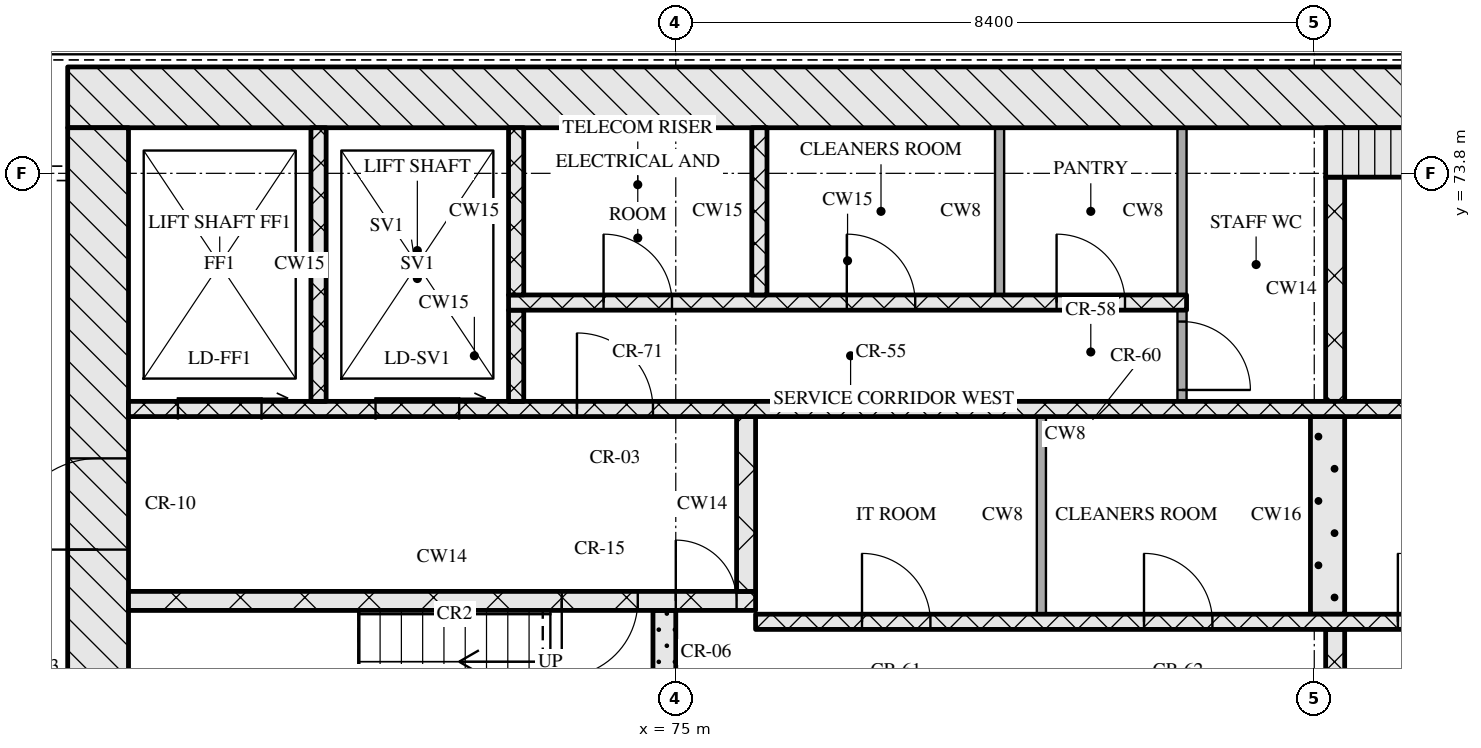
"""IFC4 building model, lengths in metres.
Left out: names, types, materials, properties, quantities, classifications, styles, units other than length and angle.
Written with IfcOpenShell. Run it as: python <this file> out.ifc"""

import sys

from ifc_helpers import new_model, si_unit, direction, frame, frame_2d, origin, place, context, subcontext, project, spatial, rectangle, extrude, element, fill, save


model = new_model("IFC4")
c1 = context("Model", 3, precision=1e-05, world=origin(), true_north=direction((0.0, 1.0)))
c2 = subcontext(c1, "Body", "Model", "MODEL_VIEW")
j1 = project(units=[si_unit("LENGTHUNIT", "METRE"), si_unit("PLANEANGLEUNIT", "RADIAN")], contexts=[c1])
p1 = place(None, origin())
s1 = spatial("IfcSite", under=j1, at=p1, CompositionType="ELEMENT")
p2 = place(p1, origin())
s2 = spatial("IfcBuilding", under=s1, at=p2, CompositionType="ELEMENT")
p3 = place(p2, frame((0.0, 0.0, 147.45)))
s3 = spatial("IfcBuildingStorey", under=s2, at=p3, CompositionType="ELEMENT", Elevation=147.45)
p4 = place(p3, frame((67.0, 74.8, 0.0), z_axis=(0.0, 0.0, 1.0), x_axis=(1.0, 0.0, 0.0)))
e1 = element("IfcWall", 1, at=p4, inside=s3, PredefinedType="SOLIDWALL", context=c2, shape_type="SweptSolid", body=[
    extrude(rectangle(XDim=41.2, YDim=0.8, at=frame_2d((20.6, 0.0))), origin(), (0.0, 0.0, 1.0), 3.32),
])
p5 = place(p3, frame((67.4, 62.4, 0.0), z_axis=(0.0, 0.0, 1.0), x_axis=(0.0, 1.0, 0.0)))
e2 = element("IfcWall", 2, at=p5, inside=s3, PredefinedType="SOLIDWALL", context=c2, shape_type="SweptSolid", body=[
    extrude(rectangle(XDim=12.0, YDim=0.8, at=frame_2d((6.0, 0.0))), origin(), (0.0, 0.0, 1.0), 3.32),
])
p6 = place(p5, frame((6.45, 0.0, 0.0)))
e3 = element("IfcOpeningElement", 3, at=p6, cuts=e2, PredefinedType="OPENING", context=c2, shape_type="SweptSolid", body=[
    extrude(rectangle(XDim=1.2, YDim=2.1, at=frame_2d((0.6, 1.05))), frame((0.0, 0.41, 0.0), z_axis=(0.0, -1.0, 0.0), x_axis=(1.0, 0.0, 0.0)), (0.0, 0.0, 1.0), 0.82),
])
p7 = place(p3, frame((74.85, 65.2, 0.0), z_axis=(0.0, 0.0, 1.0), x_axis=(0.0, 1.0, 0.0)))
e4 = element("IfcWall", 4, at=p7, inside=s3, PredefinedType="SOLIDWALL", context=c2, shape_type="SweptSolid", body=[
    extrude(rectangle(XDim=2.85, YDim=0.3, at=frame_2d((1.425, 0.0))), origin(), (0.0, 0.0, 1.0), 3.32),
])
p8 = place(p3, frame((83.675, 65.2, 0.0), z_axis=(0.0, 0.0, 1.0), x_axis=(0.0, 1.0, 0.0)))
e5 = element("IfcWall", 5, at=p8, inside=s3, PredefinedType="SOLIDWALL", context=c2, shape_type="SweptSolid", body=[
    extrude(rectangle(XDim=2.6, YDim=0.25, at=frame_2d((1.3, 0.0))), origin(), (0.0, 0.0, 1.0), 3.32),
])
p9 = place(p8, frame((0.7, 0.0, 0.0)))
e6 = element("IfcOpeningElement", 6, at=p9, cuts=e5, PredefinedType="OPENING", context=c2, shape_type="SweptSolid", body=[
    extrude(rectangle(XDim=1.2, YDim=2.1, at=frame_2d((0.6, 1.05))), frame((0.0, 0.135, 0.0), z_axis=(0.0, -1.0, 0.0), x_axis=(1.0, 0.0, 0.0)), (0.0, 0.0, 1.0), 0.27),
])
p10 = place(p3, frame((76.05, 67.9, 0.0), z_axis=(0.0, 0.0, 1.0), x_axis=(1.0, 0.0, 0.0)))
e7 = element("IfcWall", 7, at=p10, inside=s3, PredefinedType="SOLIDWALL", context=c2, shape_type="SweptSolid", body=[
    extrude(rectangle(XDim=23.1, YDim=0.2, at=frame_2d((11.55, 0.0))), origin(), (0.0, 0.0, 1.0), 3.32),
])
p11 = place(p10, frame((1.4, 0.0, 0.0)))
e8 = element("IfcOpeningElement", 8, at=p11, cuts=e7, PredefinedType="OPENING", context=c2, shape_type="SweptSolid", body=[
    extrude(rectangle(XDim=0.9, YDim=2.1, at=frame_2d((0.45, 1.05))), frame((0.0, 0.11, 0.0), z_axis=(0.0, -1.0, 0.0), x_axis=(1.0, 0.0, 0.0)), (0.0, 0.0, 1.0), 0.22),
])
p12 = place(p10, frame((5.11, 0.0, 0.0)))
e9 = element("IfcOpeningElement", 9, at=p12, cuts=e7, PredefinedType="OPENING", context=c2, shape_type="SweptSolid", body=[
    extrude(rectangle(XDim=0.9, YDim=2.1, at=frame_2d((0.45, 1.05))), frame((0.0, 0.11, 0.0), z_axis=(0.0, -1.0, 0.0), x_axis=(1.0, 0.0, 0.0)), (0.0, 0.0, 1.0), 0.22),
])
p13 = place(p10, frame((8.45, 0.0, 0.0)))
e10 = element("IfcOpeningElement", 10, at=p13, cuts=e7, PredefinedType="OPENING", context=c2, shape_type="SweptSolid", body=[
    extrude(rectangle(XDim=0.9, YDim=2.1, at=frame_2d((0.45, 1.05))), frame((0.0, 0.11, 0.0), z_axis=(0.0, -1.0, 0.0), x_axis=(1.0, 0.0, 0.0)), (0.0, 0.0, 1.0), 0.22),
])
p14 = place(p10, frame((10.91, 0.0, 0.0)))
e11 = element("IfcOpeningElement", 11, at=p14, cuts=e7, PredefinedType="OPENING", context=c2, shape_type="SweptSolid", body=[
    extrude(rectangle(XDim=0.9, YDim=2.1, at=frame_2d((0.45, 1.05))), frame((0.0, 0.11, 0.0), z_axis=(0.0, -1.0, 0.0), x_axis=(1.0, 0.0, 0.0)), (0.0, 0.0, 1.0), 0.22),
])
p15 = place(p10, frame((13.55, 0.0, 0.0)))
e12 = element("IfcOpeningElement", 12, at=p15, cuts=e7, PredefinedType="OPENING", context=c2, shape_type="SweptSolid", body=[
    extrude(rectangle(XDim=1.0, YDim=2.1, at=frame_2d((0.5, 1.05))), frame((0.0, 0.11, 0.0), z_axis=(0.0, -1.0, 0.0), x_axis=(1.0, 0.0, 0.0)), (0.0, 0.0, 1.0), 0.22),
])
p16 = place(p10, frame((16.2, 0.0, 0.0)))
e13 = element("IfcOpeningElement", 13, at=p16, cuts=e7, PredefinedType="OPENING", context=c2, shape_type="SweptSolid", body=[
    extrude(rectangle(XDim=1.1, YDim=2.1, at=frame_2d((0.55, 1.05))), frame((0.0, 0.11, 0.0), z_axis=(0.0, -1.0, 0.0), x_axis=(1.0, 0.0, 0.0)), (0.0, 0.0, 1.0), 0.22),
])
p17 = place(p10, frame((18.7, 0.0, 0.0)))
e14 = element("IfcOpeningElement", 14, at=p17, cuts=e7, PredefinedType="OPENING", context=c2, shape_type="SweptSolid", body=[
    extrude(rectangle(XDim=1.1, YDim=2.1, at=frame_2d((0.55, 1.05))), frame((0.0, 0.11, 0.0), z_axis=(0.0, -1.0, 0.0), x_axis=(1.0, 0.0, 0.0)), (0.0, 0.0, 1.0), 0.22),
])
p18 = place(p10, frame((21.2, 0.0, 0.0)))
e15 = element("IfcOpeningElement", 15, at=p18, cuts=e7, PredefinedType="OPENING", context=c2, shape_type="SweptSolid", body=[
    extrude(rectangle(XDim=1.1, YDim=2.1, at=frame_2d((0.55, 1.05))), frame((0.0, 0.11, 0.0), z_axis=(0.0, -1.0, 0.0), x_axis=(1.0, 0.0, 0.0)), (0.0, 0.0, 1.0), 0.22),
])
p19 = place(p3, frame((79.81, 68.0, 0.0), z_axis=(0.0, 0.0, 1.0), x_axis=(0.0, 1.0, 0.0)))
e16 = element("IfcWall", 16, at=p19, inside=s3, PredefinedType="PARTITIONING", context=c2, shape_type="SweptSolid", body=[
    extrude(rectangle(XDim=2.6, YDim=0.12, at=frame_2d((1.3, 0.0))), origin(), (0.0, 0.0, 1.0), 3.32),
])
p20 = place(p3, frame((83.575, 68.0, 0.0), z_axis=(0.0, 0.0, 1.0), x_axis=(0.0, 1.0, 0.0)))
e17 = element("IfcWall", 17, at=p20, inside=s3, PredefinedType="SOLIDWALL", context=c2, shape_type="SweptSolid", body=[
    extrude(rectangle(XDim=2.6, YDim=0.45, at=frame_2d((1.3, 0.0))), origin(), (0.0, 0.0, 1.0), 3.32),
])
p21 = place(p3, frame((67.8, 68.175, 0.0), z_axis=(0.0, 0.0, 1.0), x_axis=(1.0, 0.0, 0.0)))
e18 = element("IfcWall", 18, at=p21, inside=s3, PredefinedType="SOLIDWALL", context=c2, shape_type="SweptSolid", body=[
    extrude(rectangle(XDim=8.25, YDim=0.25, at=frame_2d((4.125, 0.0))), origin(), (0.0, 0.0, 1.0), 3.32),
])
p22 = place(p21, frame((5.7, 0.0, 0.0)))
e19 = element("IfcOpeningElement", 19, at=p22, cuts=e18, PredefinedType="OPENING", context=c2, shape_type="SweptSolid", body=[
    extrude(rectangle(XDim=1.0, YDim=2.1, at=frame_2d((0.5, 1.05))), frame((0.0, 0.135, 0.0), z_axis=(0.0, -1.0, 0.0), x_axis=(1.0, 0.0, 0.0)), (0.0, 0.0, 1.0), 0.27),
])
p23 = place(p21, frame((7.2, 0.0, 0.0)))
e20 = element("IfcOpeningElement", 20, at=p23, cuts=e18, PredefinedType="OPENING", context=c2, shape_type="SweptSolid", body=[
    extrude(rectangle(XDim=0.8, YDim=2.1, at=frame_2d((0.4, 1.05))), frame((0.0, 0.135, 0.0), z_axis=(0.0, -1.0, 0.0), x_axis=(1.0, 0.0, 0.0)), (0.0, 0.0, 1.0), 0.27),
])
p24 = place(p3, frame((75.925, 68.3, 0.0), z_axis=(0.0, 0.0, 1.0), x_axis=(0.0, 1.0, 0.0)))
e21 = element("IfcWall", 21, at=p24, inside=s3, PredefinedType="SOLIDWALL", context=c2, shape_type="SweptSolid", body=[
    extrude(rectangle(XDim=2.3, YDim=0.25, at=frame_2d((1.15, 0.0))), origin(), (0.0, 0.0, 1.0), 3.32),
])
p25 = place(p3, frame((67.8, 70.7, 0.0), z_axis=(0.0, 0.0, 1.0), x_axis=(1.0, 0.0, 0.0)))
e22 = element("IfcWall", 22, at=p25, inside=s3, PredefinedType="SOLIDWALL", context=c2, shape_type="SweptSolid", body=[
    extrude(rectangle(XDim=39.6, YDim=0.2, at=frame_2d((19.8, 0.0))), origin(), (0.0, 0.0, 1.0), 3.32),
])
p26 = place(p25, frame((0.65, 0.0, 0.0)))
e23 = element("IfcOpeningElement", 23, at=p26, cuts=e22, PredefinedType="OPENING", context=c2, shape_type="SweptSolid", body=[
    extrude(rectangle(XDim=1.1, YDim=2.1, at=frame_2d((0.55, 1.05))), frame((0.0, 0.11, 0.0), z_axis=(0.0, -1.0, 0.0), x_axis=(1.0, 0.0, 0.0)), (0.0, 0.0, 1.0), 0.22),
])
p27 = place(p25, frame((3.25, 0.0, 0.0)))
e24 = element("IfcOpeningElement", 24, at=p27, cuts=e22, PredefinedType="OPENING", context=c2, shape_type="SweptSolid", body=[
    extrude(rectangle(XDim=1.1, YDim=2.1, at=frame_2d((0.55, 1.05))), frame((0.0, 0.11, 0.0), z_axis=(0.0, -1.0, 0.0), x_axis=(1.0, 0.0, 0.0)), (0.0, 0.0, 1.0), 0.22),
])
p28 = place(p25, frame((5.9, 0.0, 0.0)))
e25 = element("IfcOpeningElement", 25, at=p28, cuts=e22, PredefinedType="OPENING", context=c2, shape_type="SweptSolid", body=[
    extrude(rectangle(XDim=1.0, YDim=2.1, at=frame_2d((0.5, 1.05))), frame((0.0, 0.11, 0.0), z_axis=(0.0, -1.0, 0.0), x_axis=(1.0, 0.0, 0.0)), (0.0, 0.0, 1.0), 0.22),
])
p29 = place(p25, frame((21.7, 0.0, 0.0)))
e26 = element("IfcOpeningElement", 26, at=p29, cuts=e22, PredefinedType="OPENING", context=c2, shape_type="SweptSolid", body=[
    extrude(rectangle(XDim=1.0, YDim=2.1, at=frame_2d((0.5, 1.05))), frame((0.0, 0.11, 0.0), z_axis=(0.0, -1.0, 0.0), x_axis=(1.0, 0.0, 0.0)), (0.0, 0.0, 1.0), 0.22),
])
p30 = place(p25, frame((32.7, 0.0, 0.0)))
e27 = element("IfcOpeningElement", 27, at=p30, cuts=e22, PredefinedType="OPENING", context=c2, shape_type="SweptSolid", body=[
    extrude(rectangle(XDim=1.0, YDim=2.1, at=frame_2d((0.5, 1.05))), frame((0.0, 0.11, 0.0), z_axis=(0.0, -1.0, 0.0), x_axis=(1.0, 0.0, 0.0)), (0.0, 0.0, 1.0), 0.22),
])
p31 = place(p25, frame((35.25, 0.0, 0.0)))
e28 = element("IfcOpeningElement", 28, at=p31, cuts=e22, PredefinedType="OPENING", context=c2, shape_type="SweptSolid", body=[
    extrude(rectangle(XDim=1.1, YDim=2.1, at=frame_2d((0.55, 1.05))), frame((0.0, 0.11, 0.0), z_axis=(0.0, -1.0, 0.0), x_axis=(1.0, 0.0, 0.0)), (0.0, 0.0, 1.0), 0.22),
])
p32 = place(p25, frame((37.85, 0.0, 0.0)))
e29 = element("IfcOpeningElement", 29, at=p32, cuts=e22, PredefinedType="OPENING", context=c2, shape_type="SweptSolid", body=[
    extrude(rectangle(XDim=1.1, YDim=2.1, at=frame_2d((0.55, 1.05))), frame((0.0, 0.11, 0.0), z_axis=(0.0, -1.0, 0.0), x_axis=(1.0, 0.0, 0.0)), (0.0, 0.0, 1.0), 0.22),
])
p33 = place(p3, frame((70.3, 70.8, 0.0), z_axis=(0.0, 0.0, 1.0), x_axis=(0.0, 1.0, 0.0)))
e30 = element("IfcWall", 30, at=p33, inside=s3, PredefinedType="SOLIDWALL", context=c2, shape_type="SweptSolid", body=[
    extrude(rectangle(XDim=3.6, YDim=0.2, at=frame_2d((1.8, 0.0))), origin(), (0.0, 0.0, 1.0), 3.32),
])
p34 = place(p3, frame((72.9, 70.8, 0.0), z_axis=(0.0, 0.0, 1.0), x_axis=(0.0, 1.0, 0.0)))
e31 = element("IfcWall", 31, at=p34, inside=s3, PredefinedType="SOLIDWALL", context=c2, shape_type="SweptSolid", body=[
    extrude(rectangle(XDim=1.2, YDim=0.2, at=frame_2d((0.6, 0.0))), origin(), (0.0, 0.0, 1.0), 3.32),
])
p35 = place(p3, frame((81.66, 70.8, 0.0), z_axis=(0.0, 0.0, 1.0), x_axis=(0.0, 1.0, 0.0)))
e32 = element("IfcWall", 32, at=p35, inside=s3, PredefinedType="PARTITIONING", context=c2, shape_type="SweptSolid", body=[
    extrude(rectangle(XDim=1.2, YDim=0.12, at=frame_2d((0.6, 0.0))), origin(), (0.0, 0.0, 1.0), 3.32),
])
p36 = place(p35, frame((0.15, 0.0, 0.0)))
e33 = element("IfcOpeningElement", 33, at=p36, cuts=e32, PredefinedType="OPENING", context=c2, shape_type="SweptSolid", body=[
    extrude(rectangle(XDim=0.9, YDim=2.1, at=frame_2d((0.45, 1.05))), frame((0.0, 0.07, 0.0), z_axis=(0.0, -1.0, 0.0), x_axis=(1.0, 0.0, 0.0)), (0.0, 0.0, 1.0), 0.14),
])
p37 = place(p3, frame((83.675, 70.8, 0.0), z_axis=(0.0, 0.0, 1.0), x_axis=(0.0, 1.0, 0.0)))
e34 = element("IfcWall", 34, at=p37, inside=s3, PredefinedType="SOLIDWALL", context=c2, shape_type="SweptSolid", body=[
    extrude(rectangle(XDim=2.95, YDim=0.25, at=frame_2d((1.475, 0.0))), origin(), (0.0, 0.0, 1.0), 3.32),
])
p38 = place(p3, frame((72.8, 72.1, 0.0), z_axis=(0.0, 0.0, 1.0), x_axis=(1.0, 0.0, 0.0)))
e35 = element("IfcWall", 35, at=p38, inside=s3, PredefinedType="SOLIDWALL", context=c2, shape_type="SweptSolid", body=[
    extrude(rectangle(XDim=8.92, YDim=0.2, at=frame_2d((4.46, 0.0))), origin(), (0.0, 0.0, 1.0), 3.32),
])
p39 = place(p38, frame((1.25, 0.0, 0.0)))
e36 = element("IfcOpeningElement", 36, at=p39, cuts=e35, PredefinedType="OPENING", context=c2, shape_type="SweptSolid", body=[
    extrude(rectangle(XDim=0.9, YDim=2.1, at=frame_2d((0.45, 1.05))), frame((0.0, 0.11, 0.0), z_axis=(0.0, -1.0, 0.0), x_axis=(1.0, 0.0, 0.0)), (0.0, 0.0, 1.0), 0.22),
])
p40 = place(p38, frame((4.45, 0.0, 0.0)))
e37 = element("IfcOpeningElement", 37, at=p40, cuts=e35, PredefinedType="OPENING", context=c2, shape_type="SweptSolid", body=[
    extrude(rectangle(XDim=0.9, YDim=2.1, at=frame_2d((0.45, 1.05))), frame((0.0, 0.11, 0.0), z_axis=(0.0, -1.0, 0.0), x_axis=(1.0, 0.0, 0.0)), (0.0, 0.0, 1.0), 0.22),
])
p41 = place(p38, frame((7.21, 0.0, 0.0)))
e38 = element("IfcOpeningElement", 38, at=p41, cuts=e35, PredefinedType="OPENING", context=c2, shape_type="SweptSolid", body=[
    extrude(rectangle(XDim=0.9, YDim=2.1, at=frame_2d((0.45, 1.05))), frame((0.0, 0.11, 0.0), z_axis=(0.0, -1.0, 0.0), x_axis=(1.0, 0.0, 0.0)), (0.0, 0.0, 1.0), 0.22),
])
for number, where, z_axis, x_axis in (
    (39, (72.9, 72.2, 0.0), (0.0, 0.0, 1.0), (0.0, 1.0, 0.0)),
    (40, (76.1, 72.2, 0.0), (0.0, 0.0, 1.0), (0.0, 1.0, 0.0)),
):
    element("IfcWall", number, at=place(p3, frame(where, z_axis=z_axis, x_axis=x_axis)), inside=s3, PredefinedType="SOLIDWALL", context=c2, shape_type="SweptSolid", body=[
        extrude(rectangle(XDim=2.2, YDim=0.2, at=frame_2d((1.1, 0.0))), origin(), (0.0, 0.0, 1.0), 3.32),
    ])
for number, where, z_axis, x_axis in (
    (41, (79.26, 72.2, 0.0), (0.0, 0.0, 1.0), (0.0, 1.0, 0.0)),
    (42, (81.66, 72.2, 0.0), (0.0, 0.0, 1.0), (0.0, 1.0, 0.0)),
):
    element("IfcWall", number, at=place(p3, frame(where, z_axis=z_axis, x_axis=x_axis)), inside=s3, PredefinedType="PARTITIONING", context=c2, shape_type="SweptSolid", body=[
        extrude(rectangle(XDim=2.2, YDim=0.12, at=frame_2d((1.1, 0.0))), origin(), (0.0, 0.0, 1.0), 3.32),
    ])
p42 = place(p3, frame((83.55, 74.075, 0.0), z_axis=(0.0, 0.0, 1.0), x_axis=(1.0, 0.0, 0.0)))
e43 = element("IfcWall", 43, at=p42, inside=s3, PredefinedType="SOLIDWALL", context=c2, shape_type="SweptSolid", body=[
    extrude(rectangle(XDim=8.1, YDim=0.65, at=frame_2d((4.05, 0.0))), origin(), (0.0, 0.0, 1.0), 3.32),
])
p43 = place(p11, origin())
e44 = element("IfcDoor", 44, at=p43, inside=s3, OperationType="SINGLE_SWING_LEFT", PredefinedType="DOOR", context=c2, shape_type="SweptSolid", body=[
    extrude(rectangle(XDim=0.9, YDim=2.1, at=frame_2d((0.45, 1.05))), frame((0.0, 0.025, 0.0), z_axis=(0.0, -1.0, 0.0), x_axis=(1.0, 0.0, 0.0)), (0.0, 0.0, 1.0), 0.05),
])
fill(e8, e44)
p44 = place(p12, origin())
e45 = element("IfcDoor", 45, at=p44, inside=s3, OperationType="SINGLE_SWING_LEFT", PredefinedType="DOOR", context=c2, shape_type="SweptSolid", body=[
    extrude(rectangle(XDim=0.9, YDim=2.1, at=frame_2d((0.45, 1.05))), frame((0.0, 0.025, 0.0), z_axis=(0.0, -1.0, 0.0), x_axis=(1.0, 0.0, 0.0)), (0.0, 0.0, 1.0), 0.05),
])
fill(e9, e45)
p45 = place(p13, origin())
e46 = element("IfcDoor", 46, at=p45, inside=s3, OperationType="SINGLE_SWING_LEFT", PredefinedType="DOOR", context=c2, shape_type="SweptSolid", body=[
    extrude(rectangle(XDim=0.9, YDim=2.1, at=frame_2d((0.45, 1.05))), frame((0.0, 0.025, 0.0), z_axis=(0.0, -1.0, 0.0), x_axis=(1.0, 0.0, 0.0)), (0.0, 0.0, 1.0), 0.05),
])
fill(e10, e46)
p46 = place(p22, origin())
e47 = element("IfcDoor", 47, at=p46, inside=s3, OperationType="SINGLE_SWING_RIGHT", PredefinedType="DOOR", context=c2, shape_type="SweptSolid", body=[
    extrude(rectangle(XDim=1.0, YDim=2.1, at=frame_2d((0.5, 1.05))), frame((0.0, 0.025, 0.0), z_axis=(0.0, -1.0, 0.0), x_axis=(1.0, 0.0, 0.0)), (0.0, 0.0, 1.0), 0.05),
])
fill(e19, e47)
p47 = place(p23, origin())
e48 = element("IfcDoor", 48, at=p47, inside=s3, OperationType="SINGLE_SWING_LEFT", PredefinedType="DOOR", context=c2, shape_type="SweptSolid", body=[
    extrude(rectangle(XDim=0.8, YDim=2.1, at=frame_2d((0.4, 1.05))), frame((0.0, 0.025, 0.0), z_axis=(0.0, -1.0, 0.0), x_axis=(1.0, 0.0, 0.0)), (0.0, 0.0, 1.0), 0.05),
])
fill(e20, e48)
p48 = place(p6, origin())
e49 = element("IfcDoor", 49, at=p48, inside=s3, OperationType="SINGLE_SWING_LEFT", PredefinedType="DOOR", context=c2, shape_type="SweptSolid", body=[
    extrude(rectangle(XDim=1.2, YDim=2.1, at=frame_2d((0.6, 1.05))), frame((0.0, 0.025, 0.0), z_axis=(0.0, -1.0, 0.0), x_axis=(1.0, 0.0, 0.0)), (0.0, 0.0, 1.0), 0.05),
])
fill(e3, e49)
p49 = place(p26, origin())
e50 = element("IfcDoor", 50, at=p49, inside=s3, OperationType="SLIDING_TO_RIGHT", PredefinedType="DOOR", context=c2, shape_type="SweptSolid", body=[
    extrude(rectangle(XDim=1.1, YDim=2.1, at=frame_2d((0.55, 1.05))), frame((0.0, 0.025, 0.0), z_axis=(0.0, -1.0, 0.0), x_axis=(1.0, 0.0, 0.0)), (0.0, 0.0, 1.0), 0.05),
])
fill(e23, e50)
p50 = place(p27, origin())
e51 = element("IfcDoor", 51, at=p50, inside=s3, OperationType="SLIDING_TO_RIGHT", PredefinedType="DOOR", context=c2, shape_type="SweptSolid", body=[
    extrude(rectangle(XDim=1.1, YDim=2.1, at=frame_2d((0.55, 1.05))), frame((0.0, 0.025, 0.0), z_axis=(0.0, -1.0, 0.0), x_axis=(1.0, 0.0, 0.0)), (0.0, 0.0, 1.0), 0.05),
])
fill(e24, e51)
p51 = place(p28, origin())
e52 = element("IfcDoor", 52, at=p51, inside=s3, OperationType="SINGLE_SWING_LEFT", PredefinedType="DOOR", context=c2, shape_type="SweptSolid", body=[
    extrude(rectangle(XDim=1.0, YDim=2.1, at=frame_2d((0.5, 1.05))), frame((0.0, 0.025, 0.0), z_axis=(0.0, -1.0, 0.0), x_axis=(1.0, 0.0, 0.0)), (0.0, 0.0, 1.0), 0.05),
])
fill(e25, e52)
p52 = place(p36, origin())
e53 = element("IfcDoor", 53, at=p52, inside=s3, OperationType="SINGLE_SWING_RIGHT", PredefinedType="DOOR", context=c2, shape_type="SweptSolid", body=[
    extrude(rectangle(XDim=0.9, YDim=2.1, at=frame_2d((0.45, 1.05))), frame((0.0, 0.025, 0.0), z_axis=(0.0, -1.0, 0.0), x_axis=(1.0, 0.0, 0.0)), (0.0, 0.0, 1.0), 0.05),
])
fill(e33, e53)
p53 = place(p39, origin())
e54 = element("IfcDoor", 54, at=p53, inside=s3, OperationType="SINGLE_SWING_LEFT", PredefinedType="DOOR", context=c2, shape_type="SweptSolid", body=[
    extrude(rectangle(XDim=0.9, YDim=2.1, at=frame_2d((0.45, 1.05))), frame((0.0, 0.025, 0.0), z_axis=(0.0, -1.0, 0.0), x_axis=(1.0, 0.0, 0.0)), (0.0, 0.0, 1.0), 0.05),
])
fill(e36, e54)
p54 = place(p40, origin())
e55 = element("IfcDoor", 55, at=p54, inside=s3, OperationType="SINGLE_SWING_LEFT", PredefinedType="DOOR", context=c2, shape_type="SweptSolid", body=[
    extrude(rectangle(XDim=0.9, YDim=2.1, at=frame_2d((0.45, 1.05))), frame((0.0, 0.025, 0.0), z_axis=(0.0, -1.0, 0.0), x_axis=(1.0, 0.0, 0.0)), (0.0, 0.0, 1.0), 0.05),
])
fill(e37, e55)
p55 = place(p41, origin())
e56 = element("IfcDoor", 56, at=p55, inside=s3, OperationType="SINGLE_SWING_LEFT", PredefinedType="DOOR", context=c2, shape_type="SweptSolid", body=[
    extrude(rectangle(XDim=0.9, YDim=2.1, at=frame_2d((0.45, 1.05))), frame((0.0, 0.025, 0.0), z_axis=(0.0, -1.0, 0.0), x_axis=(1.0, 0.0, 0.0)), (0.0, 0.0, 1.0), 0.05),
])
fill(e38, e56)
save(model, sys.argv[1])
